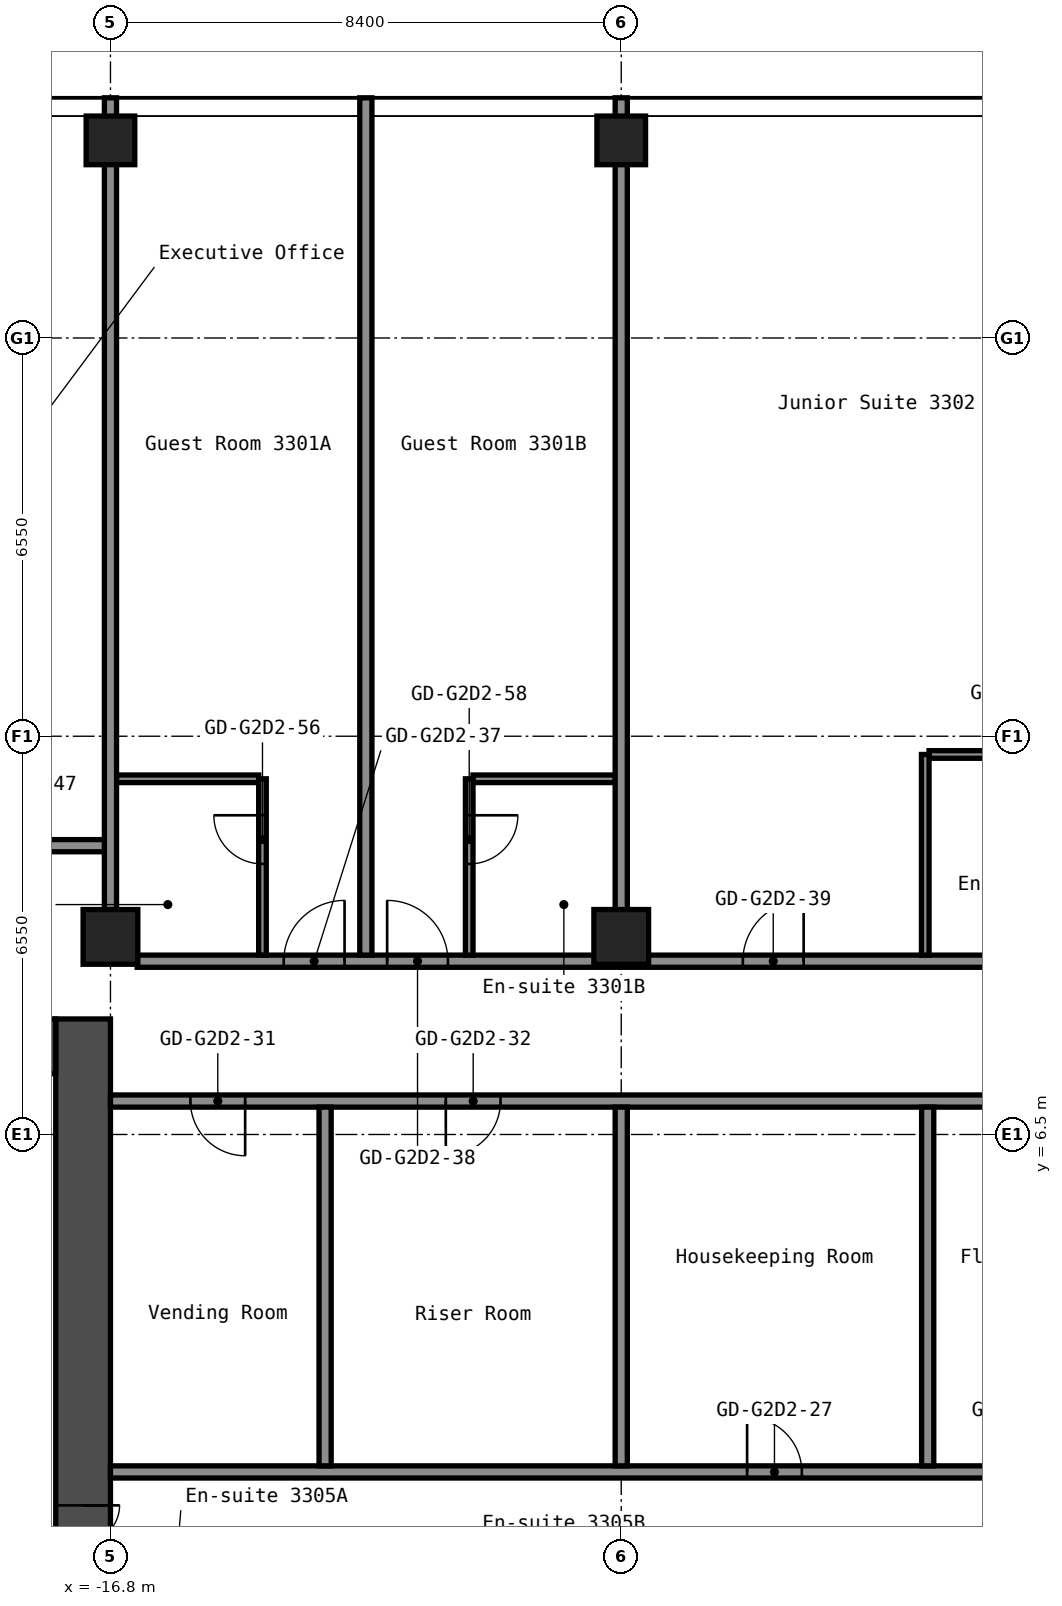
"""IFC4 building model, lengths in metres.
Left out: names, types, materials, properties, quantities, classifications, styles, units other than length and angle.
Written with IfcOpenShell. Run it as: python <this file> out.ifc"""

import sys

from ifc_helpers import new_model, si_unit, direction, frame, frame_2d, origin, origin_2d, place, context, subcontext, project, spatial, rectangle, hollow_rectangle, extrude, element, fill, save


model = new_model("IFC4")
c1 = context("Model", 3, precision=1e-05, world=origin(), true_north=direction((0.0, 1.0)))
c2 = subcontext(c1, "Body", "Model", "MODEL_VIEW")
j1 = project(units=[si_unit("LENGTHUNIT", "METRE"), si_unit("PLANEANGLEUNIT", "RADIAN")], contexts=[c1])
p1 = place(None, origin())
s1 = spatial("IfcSite", under=j1, at=p1, CompositionType="ELEMENT")
p2 = place(p1, origin())
s2 = spatial("IfcBuilding", under=s1, at=p2, CompositionType="ELEMENT")
p3 = place(p2, frame((0.0, 0.0, 117.0)))
s3 = spatial("IfcBuildingStorey", under=s2, at=p3, CompositionType="ELEMENT", Elevation=117.0)
p4 = place(p3, frame((-16.8, 9.75, 0.0), z_axis=(0.0, 0.0, 1.0), x_axis=(1.0, 0.0, 0.0)))
e1 = element("IfcColumn", 1, at=p4, inside=s3, PredefinedType="COLUMN", context=c2, shape_type="SweptSolid", body=[
    extrude(hollow_rectangle(XDim=0.9, YDim=0.9, WallThickness=0.036, at=origin_2d()), origin(), (0.0, 0.0, 1.0), 2.9),
])
p5 = place(p3, frame((-16.8, 22.85, 0.0), z_axis=(0.0, 0.0, 1.0), x_axis=(1.0, 0.0, 0.0)))
e2 = element("IfcColumn", 2, at=p5, inside=s3, PredefinedType="COLUMN", context=c2, shape_type="SweptSolid", body=[
    extrude(hollow_rectangle(XDim=0.8, YDim=0.8, WallThickness=0.032, at=origin_2d()), origin(), (0.0, 0.0, 1.0), 2.9),
])
p6 = place(p3, frame((-8.4, 9.75, 0.0), z_axis=(0.0, 0.0, 1.0), x_axis=(1.0, 0.0, 0.0)))
e3 = element("IfcColumn", 3, at=p6, inside=s3, PredefinedType="COLUMN", context=c2, shape_type="SweptSolid", body=[
    extrude(hollow_rectangle(XDim=0.9, YDim=0.9, WallThickness=0.036, at=origin_2d()), origin(), (0.0, 0.0, 1.0), 2.9),
])
p7 = place(p3, frame((-8.4, 22.85, 0.0), z_axis=(0.0, 0.0, 1.0), x_axis=(1.0, 0.0, 0.0)))
e4 = element("IfcColumn", 4, at=p7, inside=s3, PredefinedType="COLUMN", context=c2, shape_type="SweptSolid", body=[
    extrude(hollow_rectangle(XDim=0.8, YDim=0.8, WallThickness=0.032, at=origin_2d()), origin(), (0.0, 0.0, 1.0), 2.9),
])
p8 = place(p3, frame((-17.25, -8.4, 0.0), z_axis=(0.0, 0.0, 1.0), x_axis=(0.0, 1.0, 0.0)))
e5 = element("IfcWall", 5, at=p8, inside=s3, PredefinedType="SHEAR", context=c2, shape_type="SweptSolid", body=[
    extrude(rectangle(XDim=16.8, YDim=0.9, at=frame_2d((8.4, 0.0))), origin(), (0.0, 0.0, 1.0), 2.9),
])
p9 = place(p8, frame((7.6, 0.0, 0.0)))
e6 = element("IfcOpeningElement", 6, at=p9, cuts=e5, PredefinedType="OPENING", context=c2, shape_type="SweptSolid", body=[
    extrude(rectangle(XDim=1.2, YDim=2.1, at=frame_2d((0.6, 1.05))), frame((0.0, 0.46, 0.0), z_axis=(0.0, -1.0, 0.0), x_axis=(1.0, 0.0, 0.0)), (0.0, 0.0, 1.0), 0.92),
])
p10 = place(p3, frame((-32.7, 7.95, 0.0), z_axis=(0.0, 0.0, 1.0), x_axis=(1.0, 0.0, 0.0)))
e7 = element("IfcWall", 7, at=p10, inside=s3, PredefinedType="SHEAR", context=c2, shape_type="SweptSolid", body=[
    extrude(rectangle(XDim=15.0, YDim=0.9, at=frame_2d((7.5, 0.0))), origin(), (0.0, 0.0, 1.0), 2.9),
])
p11 = place(p10, frame((3.4, 0.0, 0.0)))
e8 = element("IfcOpeningElement", 8, at=p11, cuts=e7, PredefinedType="OPENING", context=c2, shape_type="SweptSolid", body=[
    extrude(rectangle(XDim=1.2, YDim=2.1, at=frame_2d((0.6, 1.05))), frame((0.0, 0.46, 0.0), z_axis=(0.0, -1.0, 0.0), x_axis=(1.0, 0.0, 0.0)), (0.0, 0.0, 1.0), 0.92),
])
p12 = place(p10, frame((0.75, 0.0, 0.0)))
e9 = element("IfcOpeningElement", 9, at=p12, cuts=e7, PredefinedType="OPENING", context=c2, shape_type="SweptSolid", body=[
    extrude(rectangle(XDim=0.9, YDim=2.1, at=frame_2d((0.45, 1.05))), frame((0.0, 0.46, 0.0), z_axis=(0.0, -1.0, 0.0), x_axis=(1.0, 0.0, 0.0)), (0.0, 0.0, 1.0), 0.92),
])
p13 = place(p3, frame((-16.8, 0.95, 0.0), z_axis=(0.0, 0.0, 1.0), x_axis=(1.0, 0.0, 0.0)))
e10 = element("IfcWall", 10, at=p13, inside=s3, PredefinedType="PARTITIONING", context=c2, shape_type="SweptSolid", body=[
    extrude(rectangle(XDim=33.6, YDim=0.2, at=frame_2d((16.8, 0.0))), origin(), (0.0, 0.0, 1.0), 2.9),
])
p14 = place(p13, frame((10.47, 0.0, 0.0)))
e11 = element("IfcOpeningElement", 11, at=p14, cuts=e10, PredefinedType="OPENING", context=c2, shape_type="SweptSolid", body=[
    extrude(rectangle(XDim=0.9, YDim=2.1, at=frame_2d((0.45, 1.05))), frame((0.0, 0.11, 0.0), z_axis=(0.0, -1.0, 0.0), x_axis=(1.0, 0.0, 0.0)), (0.0, 0.0, 1.0), 0.22),
])
p15 = place(p13, frame((14.67, 0.0, 0.0)))
e12 = element("IfcOpeningElement", 12, at=p15, cuts=e10, PredefinedType="OPENING", context=c2, shape_type="SweptSolid", body=[
    extrude(rectangle(XDim=0.9, YDim=2.1, at=frame_2d((0.45, 1.05))), frame((0.0, 0.11, 0.0), z_axis=(0.0, -1.0, 0.0), x_axis=(1.0, 0.0, 0.0)), (0.0, 0.0, 1.0), 0.22),
])
p16 = place(p13, frame((26.43, 0.0, 0.0)))
e13 = element("IfcOpeningElement", 13, at=p16, cuts=e10, PredefinedType="OPENING", context=c2, shape_type="SweptSolid", body=[
    extrude(rectangle(XDim=0.9, YDim=2.1, at=frame_2d((0.45, 1.05))), frame((0.0, 0.11, 0.0), z_axis=(0.0, -1.0, 0.0), x_axis=(1.0, 0.0, 0.0)), (0.0, 0.0, 1.0), 0.22),
])
p17 = place(p13, frame((30.63, 0.0, 0.0)))
e14 = element("IfcOpeningElement", 14, at=p17, cuts=e10, PredefinedType="OPENING", context=c2, shape_type="SweptSolid", body=[
    extrude(rectangle(XDim=0.9, YDim=2.1, at=frame_2d((0.45, 1.05))), frame((0.0, 0.11, 0.0), z_axis=(0.0, -1.0, 0.0), x_axis=(1.0, 0.0, 0.0)), (0.0, 0.0, 1.0), 0.22),
])
p18 = place(p3, frame((-16.8, 7.05, 0.0), z_axis=(0.0, 0.0, 1.0), x_axis=(1.0, 0.0, 0.0)))
e15 = element("IfcWall", 15, at=p18, inside=s3, PredefinedType="PARTITIONING", context=c2, shape_type="SweptSolid", body=[
    extrude(rectangle(XDim=33.6, YDim=0.2, at=frame_2d((16.8, 0.0))), origin(), (0.0, 0.0, 1.0), 2.9),
])
p19 = place(p18, frame((1.315, 0.0, 0.0)))
e16 = element("IfcOpeningElement", 16, at=p19, cuts=e15, PredefinedType="OPENING", context=c2, shape_type="SweptSolid", body=[
    extrude(rectangle(XDim=0.9, YDim=2.1, at=frame_2d((0.45, 1.05))), frame((0.0, 0.11, 0.0), z_axis=(0.0, -1.0, 0.0), x_axis=(1.0, 0.0, 0.0)), (0.0, 0.0, 1.0), 0.22),
])
p20 = place(p18, frame((5.515, 0.0, 0.0)))
e17 = element("IfcOpeningElement", 17, at=p20, cuts=e15, PredefinedType="OPENING", context=c2, shape_type="SweptSolid", body=[
    extrude(rectangle(XDim=0.9, YDim=2.1, at=frame_2d((0.45, 1.05))), frame((0.0, 0.11, 0.0), z_axis=(0.0, -1.0, 0.0), x_axis=(1.0, 0.0, 0.0)), (0.0, 0.0, 1.0), 0.22),
])
p21 = place(p18, frame((18.955, 0.0, 0.0)))
e18 = element("IfcOpeningElement", 18, at=p21, cuts=e15, PredefinedType="OPENING", context=c2, shape_type="SweptSolid", body=[
    extrude(rectangle(XDim=0.9, YDim=2.1, at=frame_2d((0.45, 1.05))), frame((0.0, 0.11, 0.0), z_axis=(0.0, -1.0, 0.0), x_axis=(1.0, 0.0, 0.0)), (0.0, 0.0, 1.0), 0.22),
])
p22 = place(p18, frame((23.155, 0.0, 0.0)))
e19 = element("IfcOpeningElement", 19, at=p22, cuts=e15, PredefinedType="OPENING", context=c2, shape_type="SweptSolid", body=[
    extrude(rectangle(XDim=0.9, YDim=2.1, at=frame_2d((0.45, 1.05))), frame((0.0, 0.11, 0.0), z_axis=(0.0, -1.0, 0.0), x_axis=(1.0, 0.0, 0.0)), (0.0, 0.0, 1.0), 0.22),
])
p23 = place(p3, frame((-16.36, 9.35, 0.0), z_axis=(0.0, 0.0, 1.0), x_axis=(1.0, 0.0, 0.0)))
e20 = element("IfcWall", 20, at=p23, inside=s3, PredefinedType="PARTITIONING", context=c2, shape_type="SweptSolid", body=[
    extrude(rectangle(XDim=32.72, YDim=0.2, at=frame_2d((16.36, 0.0))), origin(), (0.0, 0.0, 1.0), 2.9),
])
p24 = place(p23, frame((2.41, 0.0, 0.0)))
e21 = element("IfcOpeningElement", 21, at=p24, cuts=e20, PredefinedType="OPENING", context=c2, shape_type="SweptSolid", body=[
    extrude(rectangle(XDim=1.0, YDim=2.1, at=frame_2d((0.5, 1.05))), frame((0.0, 0.11, 0.0), z_axis=(0.0, -1.0, 0.0), x_axis=(1.0, 0.0, 0.0)), (0.0, 0.0, 1.0), 0.22),
])
p25 = place(p23, frame((4.11, 0.0, 0.0)))
e22 = element("IfcOpeningElement", 22, at=p25, cuts=e20, PredefinedType="OPENING", context=c2, shape_type="SweptSolid", body=[
    extrude(rectangle(XDim=1.0, YDim=2.1, at=frame_2d((0.5, 1.05))), frame((0.0, 0.11, 0.0), z_axis=(0.0, -1.0, 0.0), x_axis=(1.0, 0.0, 0.0)), (0.0, 0.0, 1.0), 0.22),
])
p26 = place(p23, frame((9.96, 0.0, 0.0)))
e23 = element("IfcOpeningElement", 23, at=p26, cuts=e20, PredefinedType="OPENING", context=c2, shape_type="SweptSolid", body=[
    extrude(rectangle(XDim=1.0, YDim=2.1, at=frame_2d((0.5, 1.05))), frame((0.0, 0.11, 0.0), z_axis=(0.0, -1.0, 0.0), x_axis=(1.0, 0.0, 0.0)), (0.0, 0.0, 1.0), 0.22),
])
p27 = place(p23, frame((19.21, 0.0, 0.0)))
e24 = element("IfcOpeningElement", 24, at=p27, cuts=e20, PredefinedType="OPENING", context=c2, shape_type="SweptSolid", body=[
    extrude(rectangle(XDim=1.0, YDim=2.1, at=frame_2d((0.5, 1.05))), frame((0.0, 0.11, 0.0), z_axis=(0.0, -1.0, 0.0), x_axis=(1.0, 0.0, 0.0)), (0.0, 0.0, 1.0), 0.22),
])
p28 = place(p23, frame((20.91, 0.0, 0.0)))
e25 = element("IfcOpeningElement", 25, at=p28, cuts=e20, PredefinedType="OPENING", context=c2, shape_type="SweptSolid", body=[
    extrude(rectangle(XDim=1.0, YDim=2.1, at=frame_2d((0.5, 1.05))), frame((0.0, 0.11, 0.0), z_axis=(0.0, -1.0, 0.0), x_axis=(1.0, 0.0, 0.0)), (0.0, 0.0, 1.0), 0.22),
])
p29 = place(p23, frame((26.76, 0.0, 0.0)))
e26 = element("IfcOpeningElement", 26, at=p29, cuts=e20, PredefinedType="OPENING", context=c2, shape_type="SweptSolid", body=[
    extrude(rectangle(XDim=1.0, YDim=2.1, at=frame_2d((0.5, 1.05))), frame((0.0, 0.11, 0.0), z_axis=(0.0, -1.0, 0.0), x_axis=(1.0, 0.0, 0.0)), (0.0, 0.0, 1.0), 0.22),
])
p30 = place(p3, frame((-46.5, 11.25, 0.0), z_axis=(0.0, 0.0, 1.0), x_axis=(1.0, 0.0, 0.0)))
e27 = element("IfcWall", 27, at=p30, inside=s3, PredefinedType="PARTITIONING", context=c2, shape_type="SweptSolid", body=[
    extrude(rectangle(XDim=29.7, YDim=0.2, at=frame_2d((14.85, 0.0))), origin(), (0.0, 0.0, 1.0), 2.9),
])
p31 = place(p30, frame((1.95, 0.0, 0.0)))
e28 = element("IfcOpeningElement", 28, at=p31, cuts=e27, PredefinedType="OPENING", context=c2, shape_type="SweptSolid", body=[
    extrude(rectangle(XDim=0.9, YDim=2.1, at=frame_2d((0.45, 1.05))), frame((0.0, 0.11, 0.0), z_axis=(0.0, -1.0, 0.0), x_axis=(1.0, 0.0, 0.0)), (0.0, 0.0, 1.0), 0.22),
])
p32 = place(p30, frame((8.2, 0.0, 0.0)))
e29 = element("IfcOpeningElement", 29, at=p32, cuts=e27, PredefinedType="OPENING", context=c2, shape_type="SweptSolid", body=[
    extrude(rectangle(XDim=1.0, YDim=2.1, at=frame_2d((0.5, 1.05))), frame((0.0, 0.11, 0.0), z_axis=(0.0, -1.0, 0.0), x_axis=(1.0, 0.0, 0.0)), (0.0, 0.0, 1.0), 0.22),
])
p33 = place(p30, frame((16.6, 0.0, 0.0)))
e30 = element("IfcOpeningElement", 30, at=p33, cuts=e27, PredefinedType="OPENING", context=c2, shape_type="SweptSolid", body=[
    extrude(rectangle(XDim=1.0, YDim=2.1, at=frame_2d((0.5, 1.05))), frame((0.0, 0.11, 0.0), z_axis=(0.0, -1.0, 0.0), x_axis=(1.0, 0.0, 0.0)), (0.0, 0.0, 1.0), 0.22),
])
p34 = place(p30, frame((23.54, 0.0, 0.0)))
e31 = element("IfcOpeningElement", 31, at=p34, cuts=e27, PredefinedType="OPENING", context=c2, shape_type="SweptSolid", body=[
    extrude(rectangle(XDim=0.9, YDim=2.1, at=frame_2d((0.45, 1.05))), frame((0.0, 0.11, 0.0), z_axis=(0.0, -1.0, 0.0), x_axis=(1.0, 0.0, 0.0)), (0.0, 0.0, 1.0), 0.22),
])
p35 = place(p30, frame((27.74, 0.0, 0.0)))
e32 = element("IfcOpeningElement", 32, at=p35, cuts=e27, PredefinedType="OPENING", context=c2, shape_type="SweptSolid", body=[
    extrude(rectangle(XDim=0.9, YDim=2.1, at=frame_2d((0.45, 1.05))), frame((0.0, 0.11, 0.0), z_axis=(0.0, -1.0, 0.0), x_axis=(1.0, 0.0, 0.0)), (0.0, 0.0, 1.0), 0.22),
])
for number, where, z_axis, x_axis in (
    (33, (-16.7, 12.35, 0.0), (0.0, 0.0, 1.0), (1.0, 0.0, 0.0)),
    (34, (-10.837, 12.35, 0.0), (0.0, 0.0, 1.0), (1.0, 0.0, 0.0)),
):
    element("IfcWall", number, at=place(p3, frame(where, z_axis=z_axis, x_axis=x_axis)), inside=s3, PredefinedType="PARTITIONING", context=c2, shape_type="SweptSolid", body=[
        extrude(rectangle(XDim=2.337, YDim=0.125, at=frame_2d((1.169, 0.0))), origin(), (0.0, 0.0, 1.0), 2.9),
    ])
p36 = place(p3, frame((-3.337, 12.75, 0.0), z_axis=(0.0, 0.0, 1.0), x_axis=(1.0, 0.0, 0.0)))
e35 = element("IfcWall", 35, at=p36, inside=s3, PredefinedType="PARTITIONING", context=c2, shape_type="SweptSolid", body=[
    extrude(rectangle(XDim=3.237, YDim=0.125, at=frame_2d((1.619, 0.0))), origin(), (0.0, 0.0, 1.0), 2.9),
])
p37 = place(p36, frame((1.238, 0.0, 0.0)))
e36 = element("IfcOpeningElement", 36, at=p37, cuts=e35, PredefinedType="OPENING", context=c2, shape_type="SweptSolid", body=[
    extrude(rectangle(XDim=0.8, YDim=2.1, at=frame_2d((0.4, 1.05))), frame((0.0, 0.073, 0.0), z_axis=(0.0, -1.0, 0.0), x_axis=(1.0, 0.0, 0.0)), (0.0, 0.0, 1.0), 0.145),
])
p38 = place(p3, frame((-16.8, 10.19, 0.0), z_axis=(0.0, 0.0, 1.0), x_axis=(0.0, 1.0, 0.0)))
e37 = element("IfcWall", 37, at=p38, inside=s3, PredefinedType="PARTITIONING", context=c2, shape_type="SweptSolid", body=[
    extrude(rectangle(XDim=13.36, YDim=0.2, at=frame_2d((6.68, 0.0))), origin(), (0.0, 0.0, 1.0), 2.9),
])
p39 = place(p3, frame((-14.3, 9.45, 0.0), z_axis=(0.0, 0.0, 1.0), x_axis=(0.0, 1.0, 0.0)))
e38 = element("IfcWall", 38, at=p39, inside=s3, PredefinedType="PARTITIONING", context=c2, shape_type="SweptSolid", body=[
    extrude(rectangle(XDim=2.9, YDim=0.125, at=frame_2d((1.45, 0.0))), origin(), (0.0, 0.0, 1.0), 2.9),
])
p40 = place(p39, frame((1.5, 0.0, 0.0)))
e39 = element("IfcOpeningElement", 39, at=p40, cuts=e38, PredefinedType="OPENING", context=c2, shape_type="SweptSolid", body=[
    extrude(rectangle(XDim=0.8, YDim=2.1, at=frame_2d((0.4, 1.05))), frame((0.0, 0.073, 0.0), z_axis=(0.0, -1.0, 0.0), x_axis=(1.0, 0.0, 0.0)), (0.0, 0.0, 1.0), 0.145),
])
p41 = place(p3, frame((-13.27, 1.05, 0.0), z_axis=(0.0, 0.0, 1.0), x_axis=(0.0, 1.0, 0.0)))
e40 = element("IfcWall", 40, at=p41, inside=s3, PredefinedType="PARTITIONING", context=c2, shape_type="SweptSolid", body=[
    extrude(rectangle(XDim=5.9, YDim=0.2, at=frame_2d((2.95, 0.0))), origin(), (0.0, 0.0, 1.0), 2.9),
])
p42 = place(p3, frame((-12.6, 9.45, 0.0), z_axis=(0.0, 0.0, 1.0), x_axis=(0.0, 1.0, 0.0)))
e41 = element("IfcWall", 41, at=p42, inside=s3, PredefinedType="PARTITIONING", context=c2, shape_type="SweptSolid", body=[
    extrude(rectangle(XDim=14.1, YDim=0.2, at=frame_2d((7.05, 0.0))), origin(), (0.0, 0.0, 1.0), 2.9),
])
p43 = place(p3, frame((-10.9, 9.45, 0.0), z_axis=(0.0, 0.0, 1.0), x_axis=(0.0, 1.0, 0.0)))
e42 = element("IfcWall", 42, at=p43, inside=s3, PredefinedType="PARTITIONING", context=c2, shape_type="SweptSolid", body=[
    extrude(rectangle(XDim=2.9, YDim=0.125, at=frame_2d((1.45, 0.0))), origin(), (0.0, 0.0, 1.0), 2.9),
])
p44 = place(p43, frame((1.5, 0.0, 0.0)))
e43 = element("IfcOpeningElement", 43, at=p44, cuts=e42, PredefinedType="OPENING", context=c2, shape_type="SweptSolid", body=[
    extrude(rectangle(XDim=0.8, YDim=2.1, at=frame_2d((0.4, 1.05))), frame((0.0, 0.073, 0.0), z_axis=(0.0, -1.0, 0.0), x_axis=(1.0, 0.0, 0.0)), (0.0, 0.0, 1.0), 0.145),
])
p45 = place(p3, frame((-8.4, 1.05, 0.0), z_axis=(0.0, 0.0, 1.0), x_axis=(0.0, 1.0, 0.0)))
e44 = element("IfcWall", 44, at=p45, inside=s3, PredefinedType="PARTITIONING", context=c2, shape_type="SweptSolid", body=[
    extrude(rectangle(XDim=5.9, YDim=0.2, at=frame_2d((2.95, 0.0))), origin(), (0.0, 0.0, 1.0), 2.9),
])
p46 = place(p3, frame((-8.4, 10.19, 0.0), z_axis=(0.0, 0.0, 1.0), x_axis=(0.0, 1.0, 0.0)))
e45 = element("IfcWall", 45, at=p46, inside=s3, PredefinedType="PARTITIONING", context=c2, shape_type="SweptSolid", body=[
    extrude(rectangle(XDim=13.36, YDim=0.2, at=frame_2d((6.68, 0.0))), origin(), (0.0, 0.0, 1.0), 2.9),
])
p47 = place(p3, frame((-3.4, 9.45, 0.0), z_axis=(0.0, 0.0, 1.0), x_axis=(0.0, 1.0, 0.0)))
e46 = element("IfcWall", 46, at=p47, inside=s3, PredefinedType="PARTITIONING", context=c2, shape_type="SweptSolid", body=[
    extrude(rectangle(XDim=3.3, YDim=0.125, at=frame_2d((1.65, 0.0))), origin(), (0.0, 0.0, 1.0), 2.9),
])
p48 = place(p3, frame((-3.36, 1.05, 0.0), z_axis=(0.0, 0.0, 1.0), x_axis=(0.0, 1.0, 0.0)))
e47 = element("IfcWall", 47, at=p48, inside=s3, PredefinedType="PARTITIONING", context=c2, shape_type="SweptSolid", body=[
    extrude(rectangle(XDim=5.9, YDim=0.2, at=frame_2d((2.95, 0.0))), origin(), (0.0, 0.0, 1.0), 2.9),
])
p49 = place(p9, origin())
e48 = element("IfcDoor", 48, at=p49, inside=s3, OperationType="DOUBLE_DOOR_SINGLE_SWING", PredefinedType="DOOR", context=c2, shape_type="SweptSolid", body=[
    extrude(rectangle(XDim=1.2, YDim=2.1, at=frame_2d((0.6, 1.05))), frame((0.0, 0.025, 0.0), z_axis=(0.0, -1.0, 0.0), x_axis=(1.0, 0.0, 0.0)), (0.0, 0.0, 1.0), 0.05),
])
fill(e6, e48)
p50 = place(p14, origin())
e49 = element("IfcDoor", 49, at=p50, inside=s3, OperationType="SINGLE_SWING_RIGHT", PredefinedType="DOOR", context=c2, shape_type="SweptSolid", body=[
    extrude(rectangle(XDim=0.9, YDim=2.1, at=frame_2d((0.45, 1.05))), frame((0.0, 0.025, 0.0), z_axis=(0.0, -1.0, 0.0), x_axis=(1.0, 0.0, 0.0)), (0.0, 0.0, 1.0), 0.05),
])
fill(e11, e49)
p51 = place(p19, origin())
e50 = element("IfcDoor", 50, at=p51, inside=s3, OperationType="SINGLE_SWING_RIGHT", PredefinedType="DOOR", context=c2, shape_type="SweptSolid", body=[
    extrude(rectangle(XDim=0.9, YDim=2.1, at=frame_2d((0.45, 1.05))), frame((0.0, 0.025, 0.0), z_axis=(0.0, -1.0, 0.0), x_axis=(1.0, 0.0, 0.0)), (0.0, 0.0, 1.0), 0.05),
])
fill(e16, e50)
p52 = place(p20, origin())
e51 = element("IfcDoor", 51, at=p52, inside=s3, OperationType="SINGLE_SWING_LEFT", PredefinedType="DOOR", context=c2, shape_type="SweptSolid", body=[
    extrude(rectangle(XDim=0.9, YDim=2.1, at=frame_2d((0.45, 1.05))), frame((0.0, 0.025, 0.0), z_axis=(0.0, -1.0, 0.0), x_axis=(1.0, 0.0, 0.0)), (0.0, 0.0, 1.0), 0.05),
])
fill(e17, e51)
p53 = place(p24, origin())
e52 = element("IfcDoor", 52, at=p53, inside=s3, OperationType="SINGLE_SWING_LEFT", PredefinedType="DOOR", context=c2, shape_type="SweptSolid", body=[
    extrude(rectangle(XDim=1.0, YDim=2.1, at=frame_2d((0.5, 1.05))), frame((0.0, 0.025, 0.0), z_axis=(0.0, -1.0, 0.0), x_axis=(1.0, 0.0, 0.0)), (0.0, 0.0, 1.0), 0.05),
])
fill(e21, e52)
p54 = place(p25, origin())
e53 = element("IfcDoor", 53, at=p54, inside=s3, OperationType="SINGLE_SWING_RIGHT", PredefinedType="DOOR", context=c2, shape_type="SweptSolid", body=[
    extrude(rectangle(XDim=1.0, YDim=2.1, at=frame_2d((0.5, 1.05))), frame((0.0, 0.025, 0.0), z_axis=(0.0, -1.0, 0.0), x_axis=(1.0, 0.0, 0.0)), (0.0, 0.0, 1.0), 0.05),
])
fill(e22, e53)
p55 = place(p26, origin())
e54 = element("IfcDoor", 54, at=p55, inside=s3, OperationType="SINGLE_SWING_LEFT", PredefinedType="DOOR", context=c2, shape_type="SweptSolid", body=[
    extrude(rectangle(XDim=1.0, YDim=2.1, at=frame_2d((0.5, 1.05))), frame((0.0, 0.025, 0.0), z_axis=(0.0, -1.0, 0.0), x_axis=(1.0, 0.0, 0.0)), (0.0, 0.0, 1.0), 0.05),
])
fill(e23, e54)
p56 = place(p40, origin())
e55 = element("IfcDoor", 55, at=p56, inside=s3, OperationType="SINGLE_SWING_LEFT", PredefinedType="DOOR", context=c2, shape_type="SweptSolid", body=[
    extrude(rectangle(XDim=0.8, YDim=2.1, at=frame_2d((0.4, 1.05))), frame((0.0, 0.025, 0.0), z_axis=(0.0, -1.0, 0.0), x_axis=(1.0, 0.0, 0.0)), (0.0, 0.0, 1.0), 0.05),
])
fill(e39, e55)
p57 = place(p44, origin())
e56 = element("IfcDoor", 56, at=p57, inside=s3, OperationType="SINGLE_SWING_RIGHT", PredefinedType="DOOR", context=c2, shape_type="SweptSolid", body=[
    extrude(rectangle(XDim=0.8, YDim=2.1, at=frame_2d((0.4, 1.05))), frame((0.0, 0.025, 0.0), z_axis=(0.0, -1.0, 0.0), x_axis=(1.0, 0.0, 0.0)), (0.0, 0.0, 1.0), 0.05),
])
fill(e43, e56)
save(model, sys.argv[1])
